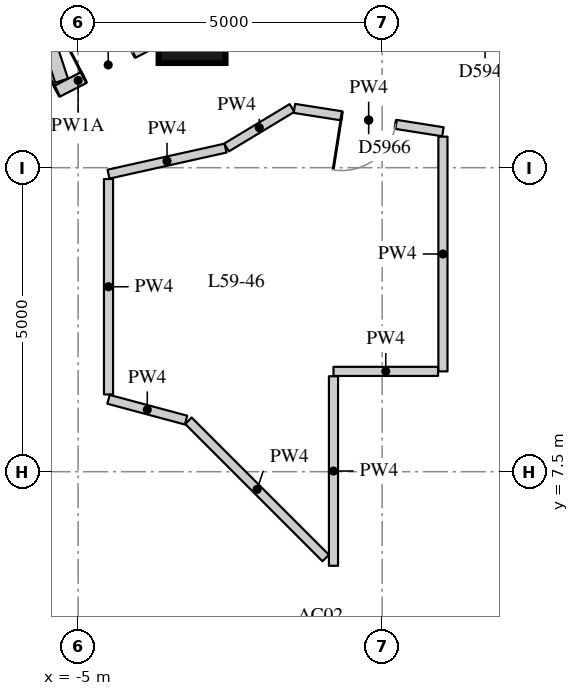
"""IFC4 building model, lengths in metres.
Left out: names, types, materials, properties, quantities, classifications, styles, units other than length and angle.
Written with IfcOpenShell. Run it as: python <this file> out.ifc"""

import sys

from ifc_helpers import new_model, si_unit, direction, frame, frame_2d, origin, origin_2d, place, context, subcontext, project, spatial, rectangle, extrude, element, fill, save


model = new_model("IFC4")
c1 = context("Model", 3, precision=1e-05, world=origin(), true_north=direction((0.0, 1.0)))
c2 = subcontext(c1, "Body", "Model", "MODEL_VIEW")
j1 = project(units=[si_unit("LENGTHUNIT", "METRE"), si_unit("PLANEANGLEUNIT", "RADIAN")], contexts=[c1])
p1 = place(None, origin())
s1 = spatial("IfcSite", under=j1, at=p1, CompositionType="ELEMENT")
p2 = place(p1, origin())
s2 = spatial("IfcBuilding", under=s1, at=p2, CompositionType="ELEMENT")
p3 = place(p2, frame((0.0, 0.0, 209.0)))
s3 = spatial("IfcBuildingStorey", under=s2, at=p3, CompositionType="ELEMENT", Elevation=209.0)
p4 = place(p3, frame((-3.126, 14.772, 0.0), z_axis=(0.0, 0.0, 1.0), x_axis=(1.0, 0.0, 0.0)))
e1 = element("IfcColumn", 1, at=p4, inside=s3, PredefinedType="COLUMN", context=c2, shape_type="SweptSolid", body=[
    extrude(rectangle(XDim=1.1, YDim=1.1, at=origin_2d()), origin(), (0.0, 0.0, 1.0), 3.3),
])
p5 = place(p3, frame((-7.557, 12.619, 0.0), z_axis=(0.0, 0.0, 1.0), x_axis=(0.889086035914, 0.457740123588, 0.0)))
e2 = element("IfcWall", 2, at=p5, inside=s3, PredefinedType="PARTITIONING", context=c2, shape_type="SweptSolid", body=[
    extrude(rectangle(XDim=5.753, YDim=0.2, at=frame_2d((2.877, 0.0))), origin(), (0.0, 0.0, 1.0), 2.57),
])
p6 = place(p5, frame((2.983, 0.0, 0.0)))
e3 = element("IfcOpeningElement", 3, at=p6, cuts=e2, PredefinedType="OPENING", context=c2, shape_type="SweptSolid", body=[
    extrude(rectangle(XDim=0.9, YDim=2.1, at=frame_2d((0.45, 1.05))), frame((0.0, 0.11, 0.0), z_axis=(0.0, -1.0, 0.0), x_axis=(1.0, 0.0, 0.0)), (0.0, 0.0, 1.0), 0.22),
])
p7 = place(p5, frame((0.685, 0.0, 0.0)))
e4 = element("IfcOpeningElement", 4, at=p7, cuts=e2, PredefinedType="OPENING", context=c2, shape_type="SweptSolid", body=[
    extrude(rectangle(XDim=1.8, YDim=2.1, at=frame_2d((0.9, 1.05))), frame((0.0, 0.11, 0.0), z_axis=(0.0, -1.0, 0.0), x_axis=(1.0, 0.0, 0.0)), (0.0, 0.0, 1.0), 0.22),
])
p8 = place(p3, frame((-2.383, 15.243, 0.0), z_axis=(0.0, 0.0, 1.0), x_axis=(0.987842256944, -0.15545956193, 0.0)))
e5 = element("IfcWall", 5, at=p8, inside=s3, PredefinedType="PARTITIONING", context=c2, shape_type="SweptSolid", body=[
    extrude(rectangle(XDim=12.188, YDim=0.2, at=frame_2d((6.094, 0.0))), origin(), (0.0, 0.0, 1.0), 2.42),
])
p9 = place(p8, frame((7.069, 0.0, 0.0)))
e6 = element("IfcOpeningElement", 6, at=p9, cuts=e5, PredefinedType="OPENING", context=c2, shape_type="SweptSolid", body=[
    extrude(rectangle(XDim=0.9, YDim=2.1, at=frame_2d((0.45, 1.05))), frame((0.0, 0.11, 0.0), z_axis=(0.0, -1.0, 0.0), x_axis=(1.0, 0.0, 0.0)), (0.0, 0.0, 1.0), 0.22),
])
p10 = place(p8, frame((3.676, 0.0, 0.0)))
e7 = element("IfcOpeningElement", 7, at=p10, cuts=e5, PredefinedType="OPENING", context=c2, shape_type="SweptSolid", body=[
    extrude(rectangle(XDim=0.9, YDim=2.1, at=frame_2d((0.45, 1.05))), frame((0.0, 0.11, 0.0), z_axis=(0.0, -1.0, 0.0), x_axis=(1.0, 0.0, 0.0)), (0.0, 0.0, 1.0), 0.22),
])
p11 = place(p8, frame((1.875, 0.0, 0.0)))
e8 = element("IfcOpeningElement", 8, at=p11, cuts=e5, PredefinedType="OPENING", context=c2, shape_type="SweptSolid", body=[
    extrude(rectangle(XDim=0.9, YDim=2.1, at=frame_2d((0.45, 1.05))), frame((0.0, 0.11, 0.0), z_axis=(0.0, -1.0, 0.0), x_axis=(1.0, 0.0, 0.0)), (0.0, 0.0, 1.0), 0.22),
])
p12 = place(p3, frame((-4.5, 12.394, 0.0), z_axis=(0.0, 0.0, 1.0), x_axis=(0.976122911094, 0.217218927437, 0.0)))
e9 = element("IfcWall", 9, at=p12, inside=s3, PredefinedType="PARTITIONING", context=c2, shape_type="SweptSolid", body=[
    extrude(rectangle(XDim=1.971, YDim=0.15, at=frame_2d((0.986, 0.0))), origin(), (0.0, 0.0, 1.0), 3.02),
])
p13 = place(p3, frame((-2.559, 12.832, 0.0), z_axis=(0.0, 0.0, 1.0), x_axis=(0.85627358004, 0.5165225611, 0.0)))
e10 = element("IfcWall", 10, at=p13, inside=s3, PredefinedType="PARTITIONING", context=c2, shape_type="SweptSolid", body=[
    extrude(rectangle(XDim=1.257, YDim=0.15, at=frame_2d((0.628, 0.0))), origin(), (0.0, 0.0, 1.0), 3.02),
])
p14 = place(p3, frame((-1.443, 13.475, 0.0), z_axis=(0.0, 0.0, 1.0), x_axis=(0.987852456019, -0.155394739734, 0.0)))
e11 = element("IfcWall", 11, at=p14, inside=s3, PredefinedType="PARTITIONING", context=c2, shape_type="SweptSolid", body=[
    extrude(rectangle(XDim=2.473, YDim=0.15, at=frame_2d((1.236, 0.0))), origin(), (0.0, 0.0, 1.0), 3.02),
])
p15 = place(p14, frame((0.786, 0.0, 0.0)))
e12 = element("IfcOpeningElement", 12, at=p15, cuts=e11, PredefinedType="OPENING", context=c2, shape_type="SweptSolid", body=[
    extrude(rectangle(XDim=0.9, YDim=2.1, at=frame_2d((0.45, 1.05))), frame((0.0, 0.085, 0.0), z_axis=(0.0, -1.0, 0.0), x_axis=(1.0, 0.0, 0.0)), (0.0, 0.0, 1.0), 0.17),
])
p16 = place(p3, frame((1.0, 13.011, 0.0), z_axis=(0.0, 0.0, 1.0), x_axis=(0.0, -1.0, 0.0)))
e13 = element("IfcWall", 13, at=p16, inside=s3, PredefinedType="PARTITIONING", context=c2, shape_type="SweptSolid", body=[
    extrude(rectangle(XDim=3.861, YDim=0.15, at=frame_2d((1.93, 0.0))), origin(), (0.0, 0.0, 1.0), 3.02),
])
p17 = place(p3, frame((0.92, 9.15, 0.0), z_axis=(0.0, 0.0, 1.0), x_axis=(-1.0, 0.0, 0.0)))
e14 = element("IfcWall", 14, at=p17, inside=s3, PredefinedType="PARTITIONING", context=c2, shape_type="SweptSolid", body=[
    extrude(rectangle(XDim=1.72, YDim=0.15, at=frame_2d((0.86, 0.0))), origin(), (0.0, 0.0, 1.0), 3.02),
])
p18 = place(p3, frame((-0.8, 9.07, 0.0), z_axis=(0.0, 0.0, 1.0), x_axis=(0.0, -1.0, 0.0)))
e15 = element("IfcWall", 15, at=p18, inside=s3, PredefinedType="PARTITIONING", context=c2, shape_type="SweptSolid", body=[
    extrude(rectangle(XDim=3.118, YDim=0.15, at=frame_2d((1.559, 0.0))), origin(), (0.0, 0.0, 1.0), 3.02),
])
p19 = place(p3, frame((-0.927, 6.08, 0.0), z_axis=(0.0, 0.0, 1.0), x_axis=(-0.707106781187, 0.707106781187, 0.0)))
e16 = element("IfcWall", 16, at=p19, inside=s3, PredefinedType="PARTITIONING", context=c2, shape_type="SweptSolid", body=[
    extrude(rectangle(XDim=3.194, YDim=0.15, at=frame_2d((1.597, 0.0))), origin(), (0.0, 0.0, 1.0), 3.02),
])
p20 = place(p3, frame((-3.225, 8.348, 0.0), z_axis=(0.0, 0.0, 1.0), x_axis=(-0.965915035697, 0.258859312783, 0.0)))
e17 = element("IfcWall", 17, at=p20, inside=s3, PredefinedType="PARTITIONING", context=c2, shape_type="SweptSolid", body=[
    extrude(rectangle(XDim=1.32, YDim=0.15, at=frame_2d((0.66, 0.0))), origin(), (0.0, 0.0, 1.0), 3.02),
])
p21 = place(p3, frame((-4.5, 8.77, 0.0), z_axis=(0.0, 0.0, 1.0), x_axis=(0.0, 1.0, 0.0)))
e18 = element("IfcWall", 18, at=p21, inside=s3, PredefinedType="PARTITIONING", context=c2, shape_type="SweptSolid", body=[
    extrude(rectangle(XDim=3.543, YDim=0.15, at=frame_2d((1.772, 0.0))), origin(), (0.0, 0.0, 1.0), 3.02),
])
p22 = place(p3, frame((-7.508, 20.743, 0.0), z_axis=(0.0, 0.0, 1.0), x_axis=(0.31199567476, -0.950083522082, 0.0)))
e19 = element("IfcWall", 19, at=p22, inside=s3, PredefinedType="PARTITIONING", context=c2, shape_type="SweptSolid", body=[
    extrude(rectangle(XDim=7.17, YDim=0.22, at=frame_2d((3.585, 0.0))), origin(), (0.0, 0.0, 1.0), 3.02),
])
p23 = place(p3, frame((-8.0, 5.554, 0.0), z_axis=(0.0, 0.0, 1.0), x_axis=(0.923860025149, -0.382730523909, 0.0)))
e20 = element("IfcWall", 20, at=p23, inside=s3, PredefinedType="PARTITIONING", context=c2, shape_type="SweptSolid", body=[
    extrude(rectangle(XDim=4.251, YDim=0.1, at=frame_2d((2.125, 0.0))), origin(), (0.0, 0.0, 1.0), 3.02),
])
p24 = place(p6, origin())
e21 = element("IfcDoor", 21, at=p24, inside=s3, OperationType="SINGLE_SWING_LEFT", PredefinedType="DOOR", context=c2, shape_type="SweptSolid", body=[
    extrude(rectangle(XDim=0.9, YDim=2.1, at=frame_2d((0.45, 1.05))), frame((0.0, 0.025, 0.0), z_axis=(0.0, -1.0, 0.0), x_axis=(1.0, 0.0, 0.0)), (0.0, 0.0, 1.0), 0.05),
])
fill(e3, e21)
p25 = place(p7, origin())
e22 = element("IfcDoor", 22, at=p25, inside=s3, OperationType="DOUBLE_DOOR_SINGLE_SWING", PredefinedType="DOOR", context=c2, shape_type="SweptSolid", body=[
    extrude(rectangle(XDim=1.8, YDim=2.1, at=frame_2d((0.9, 1.05))), frame((0.0, 0.025, 0.0), z_axis=(0.0, -1.0, 0.0), x_axis=(1.0, 0.0, 0.0)), (0.0, 0.0, 1.0), 0.05),
])
fill(e4, e22)
p26 = place(p15, origin())
e23 = element("IfcDoor", 23, at=p26, inside=s3, OperationType="SINGLE_SWING_RIGHT", PredefinedType="DOOR", context=c2, shape_type="SweptSolid", body=[
    extrude(rectangle(XDim=0.9, YDim=2.1, at=frame_2d((0.45, 1.05))), frame((0.0, 0.025, 0.0), z_axis=(0.0, -1.0, 0.0), x_axis=(1.0, 0.0, 0.0)), (0.0, 0.0, 1.0), 0.05),
])
fill(e12, e23)
save(model, sys.argv[1])
